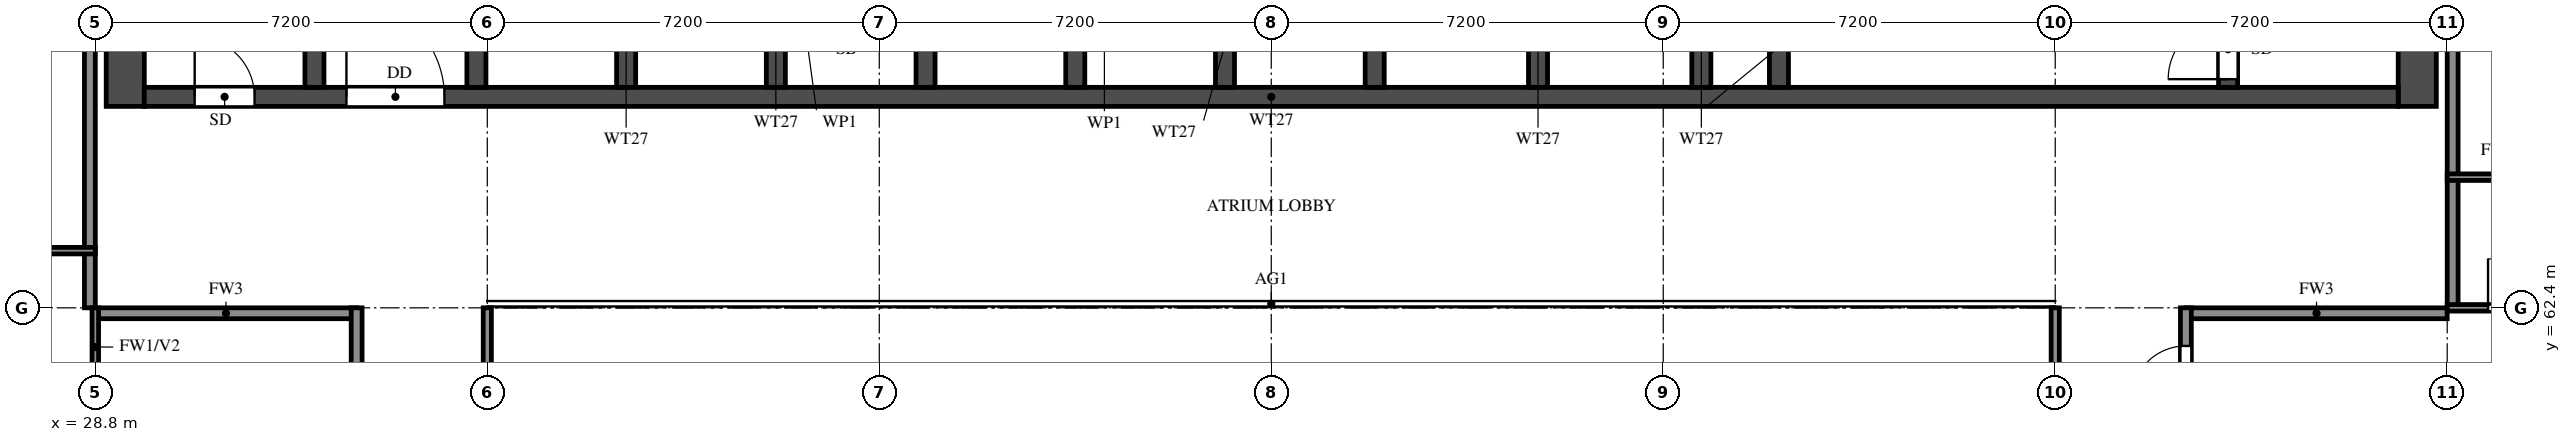
"""IFC4 building model, lengths in metres.
Left out: names, types, materials, properties, quantities, classifications, styles, units other than length and angle.
Written with IfcOpenShell. Run it as: python <this file> out.ifc"""

import sys

from ifc_helpers import new_model, si_unit, direction, frame, frame_2d, origin, place, context, subcontext, project, spatial, rectangle, extrude, element, fill, save


model = new_model("IFC4")
c1 = context("Model", 3, precision=1e-05, world=origin(), true_north=direction((0.0, 1.0)))
c2 = subcontext(c1, "Body", "Model", "MODEL_VIEW")
j1 = project(units=[si_unit("LENGTHUNIT", "METRE"), si_unit("PLANEANGLEUNIT", "RADIAN")], contexts=[c1])
p1 = place(None, origin())
s1 = spatial("IfcSite", under=j1, at=p1, CompositionType="ELEMENT")
p2 = place(p1, origin())
s2 = spatial("IfcBuilding", under=s1, at=p2, CompositionType="ELEMENT")
p3 = place(p2, frame((0.0, 0.0, 153.5)))
s3 = spatial("IfcBuildingStorey", under=s2, at=p3, CompositionType="ELEMENT", Elevation=153.5)
for number, where, z_axis, x_axis in (
    (1, (29.35, 66.1, 0.0), (0.0, 0.0, 1.0), (0.0, 1.0, 0.0)),
    (2, (71.45, 66.1, 0.0), (0.0, 0.0, 1.0), (0.0, 1.0, 0.0)),
):
    element("IfcWall", number, at=place(p3, frame(where, z_axis=z_axis, x_axis=x_axis)), inside=s3, PredefinedType="SHEAR", context=c2, shape_type="SweptSolid", body=[
        extrude(rectangle(XDim=11.9, YDim=0.7, at=frame_2d((5.95, 0.0))), origin(), (0.0, 0.0, 1.0), 3.2),
    ])
p4 = place(p3, frame((29.7, 66.275, 0.0), z_axis=(0.0, 0.0, 1.0), x_axis=(1.0, 0.0, 0.0)))
e3 = element("IfcWall", 3, at=p4, inside=s3, PredefinedType="SHEAR", context=c2, shape_type="SweptSolid", body=[
    extrude(rectangle(XDim=41.4, YDim=0.35, at=frame_2d((20.7, 0.0))), origin(), (0.0, 0.0, 1.0), 3.2),
])
p5 = place(p4, frame((0.925, 0.0, 0.0)))
e4 = element("IfcOpeningElement", 4, at=p5, cuts=e3, PredefinedType="OPENING", context=c2, shape_type="SweptSolid", body=[
    extrude(rectangle(XDim=1.1, YDim=2.1, at=frame_2d((0.55, 1.05))), frame((0.0, 0.185, 0.0), z_axis=(0.0, -1.0, 0.0), x_axis=(1.0, 0.0, 0.0)), (0.0, 0.0, 1.0), 0.37),
])
p6 = place(p4, frame((3.712, 0.0, 0.0)))
e5 = element("IfcOpeningElement", 5, at=p6, cuts=e3, PredefinedType="OPENING", context=c2, shape_type="SweptSolid", body=[
    extrude(rectangle(XDim=1.8, YDim=2.1, at=frame_2d((0.9, 1.05))), frame((0.0, 0.185, 0.0), z_axis=(0.0, -1.0, 0.0), x_axis=(1.0, 0.0, 0.0)), (0.0, 0.0, 1.0), 0.37),
])
p7 = place(p3, frame((32.825, 66.45, 0.0), z_axis=(0.0, 0.0, 1.0), x_axis=(0.0, 1.0, 0.0)))
e6 = element("IfcWall", 6, at=p7, inside=s3, PredefinedType="SHEAR", context=c2, shape_type="SweptSolid", body=[
    extrude(rectangle(XDim=10.85, YDim=0.35, at=frame_2d((5.425, 0.0))), origin(), (0.0, 0.0, 1.0), 3.2),
])
p8 = place(p3, frame((67.975, 66.45, 0.0), z_axis=(0.0, 0.0, 1.0), x_axis=(0.0, 1.0, 0.0)))
e7 = element("IfcWall", 7, at=p8, inside=s3, PredefinedType="SHEAR", context=c2, shape_type="SweptSolid", body=[
    extrude(rectangle(XDim=10.85, YDim=0.35, at=frame_2d((5.425, 0.0))), origin(), (0.0, 0.0, 1.0), 3.2),
])
p9 = place(p8, frame((0.15, 0.0, 0.0)))
e8 = element("IfcOpeningElement", 8, at=p9, cuts=e7, PredefinedType="OPENING", context=c2, shape_type="SweptSolid", body=[
    extrude(rectangle(XDim=1.1, YDim=2.1, at=frame_2d((0.55, 1.05))), frame((0.0, 0.185, 0.0), z_axis=(0.0, -1.0, 0.0), x_axis=(1.0, 0.0, 0.0)), (0.0, 0.0, 1.0), 0.37),
])
p10 = place(p3, frame((59.725, 66.45, 0.0), z_axis=(0.0, 0.0, 1.0), x_axis=(0.0, 1.0, 0.0)))
e9 = element("IfcWall", 9, at=p10, inside=s3, PredefinedType="SHEAR", context=c2, shape_type="SweptSolid", body=[
    extrude(rectangle(XDim=6.125, YDim=0.35, at=frame_2d((3.062, 0.0))), origin(), (0.0, 0.0, 1.0), 3.2),
])
p11 = place(p10, frame((3.85, 0.0, 0.0)))
e10 = element("IfcOpeningElement", 10, at=p11, cuts=e9, PredefinedType="OPENING", context=c2, shape_type="SweptSolid", body=[
    extrude(rectangle(XDim=1.2, YDim=2.1, at=frame_2d((0.6, 1.05))), frame((0.0, 0.185, 0.0), z_axis=(0.0, -1.0, 0.0), x_axis=(1.0, 0.0, 0.0)), (0.0, 0.0, 1.0), 0.37),
])
for number, where, z_axis, x_axis in (
    (11, (35.8, 66.45, 0.0), (0.0, 0.0, 1.0), (0.0, 1.0, 0.0)),
    (12, (38.55, 66.45, 0.0), (0.0, 0.0, 1.0), (0.0, 1.0, 0.0)),
    (13, (41.3, 66.45, 0.0), (0.0, 0.0, 1.0), (0.0, 1.0, 0.0)),
    (14, (44.05, 66.45, 0.0), (0.0, 0.0, 1.0), (0.0, 1.0, 0.0)),
    (15, (46.8, 66.45, 0.0), (0.0, 0.0, 1.0), (0.0, 1.0, 0.0)),
    (16, (49.55, 66.45, 0.0), (0.0, 0.0, 1.0), (0.0, 1.0, 0.0)),
    (17, (52.3, 66.45, 0.0), (0.0, 0.0, 1.0), (0.0, 1.0, 0.0)),
    (18, (55.3, 66.45, 0.0), (0.0, 0.0, 1.0), (0.0, 1.0, 0.0)),
    (19, (58.3, 66.45, 0.0), (0.0, 0.0, 1.0), (0.0, 1.0, 0.0)),
):
    element("IfcWall", number, at=place(p3, frame(where, z_axis=z_axis, x_axis=x_axis)), inside=s3, PredefinedType="SHEAR", context=c2, shape_type="SweptSolid", body=[
        extrude(rectangle(XDim=2.425, YDim=0.35, at=frame_2d((1.212, 0.0))), origin(), (0.0, 0.0, 1.0), 3.2),
    ])
for number, where, z_axis, x_axis in (
    (20, (28.8, 62.3, 0.0), (0.0, 0.0, 1.0), (1.0, 0.0, 0.0)),
    (21, (67.2, 62.3, 0.0), (0.0, 0.0, 1.0), (1.0, 0.0, 0.0)),
):
    element("IfcWall", number, at=place(p3, frame(where, z_axis=z_axis, x_axis=x_axis)), inside=s3, PredefinedType="SOLIDWALL", context=c2, shape_type="SweptSolid", body=[
        extrude(rectangle(XDim=4.8, YDim=0.2, at=frame_2d((2.4, 0.0))), origin(), (0.0, 0.0, 1.0), 3.2),
    ])
p12 = place(p3, frame((28.7, 62.4, 0.0), z_axis=(0.0, 0.0, 1.0), x_axis=(0.0, 1.0, 0.0)))
e22 = element("IfcWall", 22, at=p12, inside=s3, PredefinedType="SOLIDWALL", context=c2, shape_type="SweptSolid", body=[
    extrude(rectangle(XDim=15.6, YDim=0.2, at=frame_2d((7.8, 0.0))), origin(), (0.0, 0.0, 1.0), 3.2),
])
p13 = place(p3, frame((33.6, 50.4, 0.0), z_axis=(0.0, 0.0, 1.0), x_axis=(0.0, 1.0, 0.0)))
e23 = element("IfcWall", 23, at=p13, inside=s3, PredefinedType="SOLIDWALL", context=c2, shape_type="SweptSolid", body=[
    extrude(rectangle(XDim=12.0, YDim=0.2, at=frame_2d((6.0, 0.0))), origin(), (0.0, 0.0, 1.0), 3.2),
])
p14 = place(p13, frame((0.7, 0.0, 0.0)))
e24 = element("IfcOpeningElement", 24, at=p14, cuts=e23, PredefinedType="OPENING", context=c2, shape_type="SweptSolid", body=[
    extrude(rectangle(XDim=1.0, YDim=2.1, at=frame_2d((0.5, 1.05))), frame((0.0, 0.11, 0.0), z_axis=(0.0, -1.0, 0.0), x_axis=(1.0, 0.0, 0.0)), (0.0, 0.0, 1.0), 0.22),
])
p15 = place(p13, frame((9.7, 0.0, 0.0)))
e25 = element("IfcOpeningElement", 25, at=p15, cuts=e23, PredefinedType="OPENING", context=c2, shape_type="SweptSolid", body=[
    extrude(rectangle(XDim=1.0, YDim=2.1, at=frame_2d((0.5, 1.05))), frame((0.0, 0.11, 0.0), z_axis=(0.0, -1.0, 0.0), x_axis=(1.0, 0.0, 0.0)), (0.0, 0.0, 1.0), 0.22),
])
p16 = place(p3, frame((67.2, 60.0, 0.0), z_axis=(0.0, 0.0, 1.0), x_axis=(0.0, 1.0, 0.0)))
e26 = element("IfcWall", 26, at=p16, inside=s3, PredefinedType="SOLIDWALL", context=c2, shape_type="SweptSolid", body=[
    extrude(rectangle(XDim=2.4, YDim=0.2, at=frame_2d((1.2, 0.0))), origin(), (0.0, 0.0, 1.0), 3.2),
])
p17 = place(p16, frame((0.7, 0.0, 0.0)))
e27 = element("IfcOpeningElement", 27, at=p17, cuts=e26, PredefinedType="OPENING", context=c2, shape_type="SweptSolid", body=[
    extrude(rectangle(XDim=1.0, YDim=2.1, at=frame_2d((0.5, 1.05))), frame((0.0, 0.11, 0.0), z_axis=(0.0, -1.0, 0.0), x_axis=(1.0, 0.0, 0.0)), (0.0, 0.0, 1.0), 0.22),
])
p18 = place(p3, frame((72.1, 62.4, 0.0), z_axis=(0.0, 0.0, 1.0), x_axis=(0.0, 1.0, 0.0)))
e28 = element("IfcWall", 28, at=p18, inside=s3, PredefinedType="SOLIDWALL", context=c2, shape_type="SweptSolid", body=[
    extrude(rectangle(XDim=15.6, YDim=0.2, at=frame_2d((7.8, 0.0))), origin(), (0.0, 0.0, 1.0), 3.2),
])
p19 = place(p3, frame((72.0, 62.4, 0.0), z_axis=(0.0, 0.0, 1.0), x_axis=(1.0, 0.0, 0.0)))
e29 = element("IfcWall", 29, at=p19, inside=s3, PredefinedType="PARTITIONING", context=c2, shape_type="SweptSolid", body=[
    extrude(rectangle(XDim=2.4, YDim=0.12, at=frame_2d((1.2, 0.0))), origin(), (0.0, 0.0, 1.0), 3.2),
])
p20 = place(p19, frame((0.75, 0.0, 0.0)))
e30 = element("IfcOpeningElement", 30, at=p20, cuts=e29, PredefinedType="OPENING", context=c2, shape_type="SweptSolid", body=[
    extrude(rectangle(XDim=0.9, YDim=2.1, at=frame_2d((0.45, 1.05))), frame((0.0, 0.07, 0.0), z_axis=(0.0, -1.0, 0.0), x_axis=(1.0, 0.0, 0.0)), (0.0, 0.0, 1.0), 0.14),
])
p21 = place(p3, frame((23.7, 63.45, 0.0), z_axis=(0.0, 0.0, 1.0), x_axis=(1.0, 0.0, 0.0)))
e31 = element("IfcWall", 31, at=p21, inside=s3, PredefinedType="PARTITIONING", context=c2, shape_type="SweptSolid", body=[
    extrude(rectangle(XDim=5.1, YDim=0.12, at=frame_2d((2.55, 0.0))), origin(), (0.0, 0.0, 1.0), 3.2),
])
p22 = place(p3, frame((72.0, 64.8, 0.0), z_axis=(0.0, 0.0, 1.0), x_axis=(1.0, 0.0, 0.0)))
e32 = element("IfcWall", 32, at=p22, inside=s3, PredefinedType="PARTITIONING", context=c2, shape_type="SweptSolid", body=[
    extrude(rectangle(XDim=5.1, YDim=0.12, at=frame_2d((2.55, 0.0))), origin(), (0.0, 0.0, 1.0), 3.2),
])
p23 = place(p22, frame((2.1, 0.0, 0.0)))
e33 = element("IfcOpeningElement", 33, at=p23, cuts=e32, PredefinedType="OPENING", context=c2, shape_type="SweptSolid", body=[
    extrude(rectangle(XDim=0.9, YDim=2.1, at=frame_2d((0.45, 1.05))), frame((0.0, 0.07, 0.0), z_axis=(0.0, -1.0, 0.0), x_axis=(1.0, 0.0, 0.0)), (0.0, 0.0, 1.0), 0.14),
])
p24 = place(p3, frame((28.8, 58.8, 0.0), z_axis=(0.0, 0.0, 1.0), x_axis=(0.0, 1.0, 0.0)))
e34 = element("IfcWall", 34, at=p24, inside=s3, PredefinedType="PARTITIONING", context=c2, shape_type="SweptSolid", body=[
    extrude(rectangle(XDim=3.6, YDim=0.12, at=frame_2d((1.8, 0.0))), origin(), (0.0, 0.0, 1.0), 3.2),
])
p25 = place(p24, frame((0.75, 0.0, 0.0)))
e35 = element("IfcOpeningElement", 35, at=p25, cuts=e34, PredefinedType="OPENING", context=c2, shape_type="SweptSolid", body=[
    extrude(rectangle(XDim=0.9, YDim=2.1, at=frame_2d((0.45, 1.05))), frame((0.0, 0.07, 0.0), z_axis=(0.0, -1.0, 0.0), x_axis=(1.0, 0.0, 0.0)), (0.0, 0.0, 1.0), 0.14),
])
for number, where, z_axis, x_axis in (
    (36, (36.0, 48.0, 0.0), (0.0, 0.0, 1.0), (0.0, 1.0, 0.0)),
    (37, (64.8, 48.0, 0.0), (0.0, 0.0, 1.0), (0.0, 1.0, 0.0)),
):
    element("IfcWall", number, at=place(p3, frame(where, z_axis=z_axis, x_axis=x_axis)), inside=s3, PredefinedType="SOLIDWALL", context=c2, shape_type="SweptSolid", body=[
        extrude(rectangle(XDim=14.4, YDim=0.15, at=frame_2d((7.2, 0.0))), origin(), (0.0, 0.0, 1.0), 2.3),
    ])
p26 = place(p5, origin())
e38 = element("IfcDoor", 38, at=p26, inside=s3, OperationType="SINGLE_SWING_LEFT", PredefinedType="DOOR", context=c2, shape_type="SweptSolid", body=[
    extrude(rectangle(XDim=1.1, YDim=2.1, at=frame_2d((0.55, 1.05))), frame((0.0, 0.025, 0.0), z_axis=(0.0, -1.0, 0.0), x_axis=(1.0, 0.0, 0.0)), (0.0, 0.0, 1.0), 0.05),
])
fill(e4, e38)
p27 = place(p9, origin())
e39 = element("IfcDoor", 39, at=p27, inside=s3, OperationType="SINGLE_SWING_LEFT", PredefinedType="DOOR", context=c2, shape_type="SweptSolid", body=[
    extrude(rectangle(XDim=1.1, YDim=2.1, at=frame_2d((0.55, 1.05))), frame((0.0, 0.025, 0.0), z_axis=(0.0, -1.0, 0.0), x_axis=(1.0, 0.0, 0.0)), (0.0, 0.0, 1.0), 0.05),
])
fill(e8, e39)
p28 = place(p6, origin())
e40 = element("IfcDoor", 40, at=p28, inside=s3, OperationType="DOUBLE_DOOR_SINGLE_SWING", PredefinedType="DOOR", context=c2, shape_type="SweptSolid", body=[
    extrude(rectangle(XDim=1.8, YDim=2.1, at=frame_2d((0.9, 1.05))), frame((0.0, 0.025, 0.0), z_axis=(0.0, -1.0, 0.0), x_axis=(1.0, 0.0, 0.0)), (0.0, 0.0, 1.0), 0.05),
])
fill(e5, e40)
p29 = place(p20, origin())
e41 = element("IfcDoor", 41, at=p29, inside=s3, OperationType="SINGLE_SWING_LEFT", PredefinedType="DOOR", context=c2, shape_type="SweptSolid", body=[
    extrude(rectangle(XDim=0.9, YDim=2.1, at=frame_2d((0.45, 1.05))), frame((0.0, 0.025, 0.0), z_axis=(0.0, -1.0, 0.0), x_axis=(1.0, 0.0, 0.0)), (0.0, 0.0, 1.0), 0.05),
])
fill(e30, e41)
p30 = place(p17, origin())
e42 = element("IfcDoor", 42, at=p30, inside=s3, OperationType="SINGLE_SWING_LEFT", PredefinedType="DOOR", context=c2, shape_type="SweptSolid", body=[
    extrude(rectangle(XDim=1.0, YDim=2.1, at=frame_2d((0.5, 1.05))), frame((0.0, 0.025, 0.0), z_axis=(0.0, -1.0, 0.0), x_axis=(1.0, 0.0, 0.0)), (0.0, 0.0, 1.0), 0.05),
])
fill(e27, e42)
save(model, sys.argv[1])
